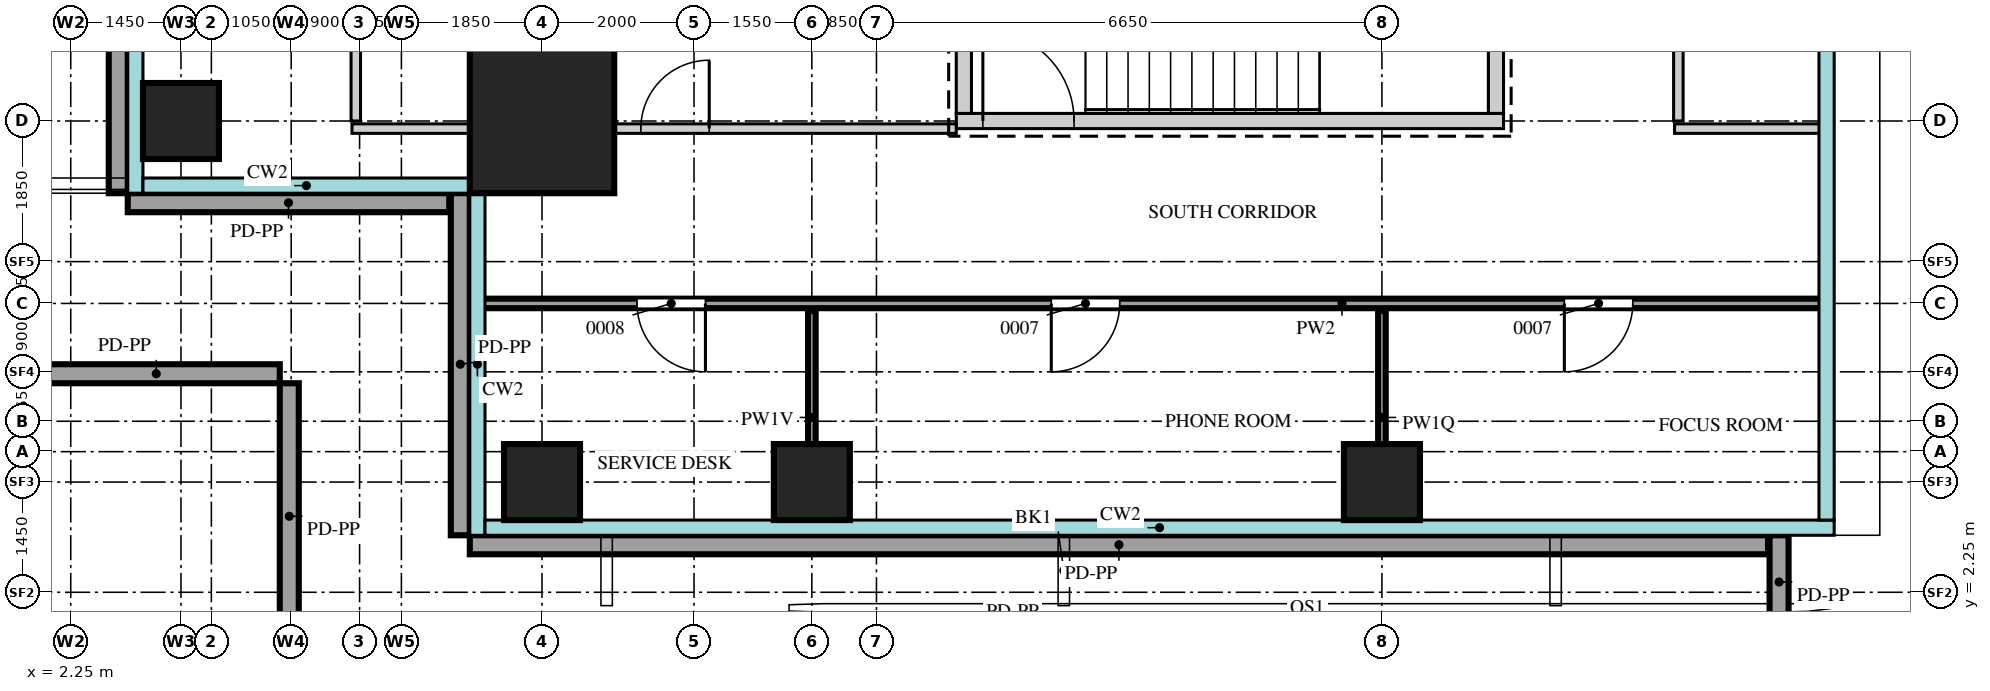
"""IFC4 building model, lengths in metres.
Left out: names, types, materials, properties, quantities, classifications, styles, units other than length and angle.
Written with IfcOpenShell. Run it as: python <this file> out.ifc"""

import sys

from ifc_helpers import new_model, si_unit, direction, frame, frame_2d, origin, origin_2d, place, context, subcontext, project, spatial, rectangle, extrude, source, transform, mapped, element, fill, save


model = new_model("IFC4")
c1 = context("Model", 3, precision=1e-05, world=origin(), true_north=direction((0.0, 1.0)))
c2 = subcontext(c1, "Body", "Model", "MODEL_VIEW")
j1 = project(units=[si_unit("LENGTHUNIT", "METRE"), si_unit("PLANEANGLEUNIT", "RADIAN")], contexts=[c1])
p1 = place(None, origin())
s1 = spatial("IfcSite", under=j1, at=p1, CompositionType="ELEMENT")
p2 = place(p1, origin())
s2 = spatial("IfcBuilding", under=s1, at=p2, CompositionType="ELEMENT")
p3 = place(p2, frame((0.0, 0.0, 164.7)))
s3 = spatial("IfcBuildingStorey", under=s2, at=p3, CompositionType="ELEMENT", Elevation=164.7)
m1 = source(origin(), c2, "Body", "SweptSolid", [
    extrude(rectangle(XDim=7.2, YDim=0.2, at=frame_2d((3.6, 0.0))), origin(), (0.0, 0.0, 1.0), 3.75),
])
p4 = place(p3, frame((13.9, 8.45, 0.0), z_axis=(0.0, 0.0, 1.0), x_axis=(1.0, 0.0, 0.0)))
e1 = element("IfcWall", 1, at=p4, inside=s3, PredefinedType="SHEAR", context=c2, shape_type="MappedRepresentation", body=[
    mapped(m1, transform((0.0, 0.0, 0.0))),
])
m2 = source(origin(), c2, "Body", "SweptSolid", [
    extrude(rectangle(XDim=1.2, YDim=2.1, at=frame_2d((0.6, 1.05))), frame((0.0, 0.11, 0.0), z_axis=(0.0, -1.0, 0.0), x_axis=(1.0, 0.0, 0.0)), (0.0, 0.0, 1.0), 0.22),
])
p5 = place(p4, frame((0.35, 0.0, 0.0)))
e2 = element("IfcOpeningElement", 2, at=p5, cuts=e1, PredefinedType="OPENING", context=c2, shape_type="MappedRepresentation", body=[
    mapped(m2, transform((0.0, 0.0, 0.0))),
])
m3 = source(origin(), c2, "Body", "SweptSolid", [
    extrude(rectangle(XDim=3.35, YDim=0.2, at=frame_2d((1.675, 0.0))), origin(), (0.0, 0.0, 1.0), 3.75),
])
for number, where, z_axis, x_axis in (
    (3, (21.0, 8.55, 0.0), (0.0, 0.0, 1.0), (0.0, 1.0, 0.0)),
    (4, (14.0, 8.55, 0.0), (0.0, 0.0, 1.0), (0.0, 1.0, 0.0)),
):
    element("IfcWall", number, at=place(p3, frame(where, z_axis=z_axis, x_axis=x_axis)), inside=s3, PredefinedType="SHEAR", context=c2, shape_type="MappedRepresentation", body=[
        mapped(m3, transform((0.0, 0.0, 0.0))),
    ])
m4 = source(origin(), c2, "Body", "SweptSolid", [
    extrude(rectangle(XDim=1.9, YDim=1.9, at=origin_2d()), origin(), (0.0, 0.0, 1.0), 4.0),
])
p6 = place(p3, frame((8.45, 8.45, 0.0), z_axis=(0.0, 0.0, 1.0), x_axis=(1.0, 0.0, 0.0)))
e5 = element("IfcColumn", 5, at=p6, inside=s3, PredefinedType="COLUMN", context=c2, shape_type="MappedRepresentation", body=[
    mapped(m4, transform((0.0, 0.0, 0.0))),
])
m5 = source(origin(), c2, "Body", "SweptSolid", [
    extrude(rectangle(XDim=1.0, YDim=1.0, at=origin_2d()), origin(), (0.0, 0.0, 1.0), 3.75),
])
for number, where, z_axis, x_axis in (
    (6, (8.45, 3.7, 0.0), (0.0, 0.0, 1.0), (1.0, 0.0, 0.0)),
    (7, (12.0, 3.7, 0.0), (0.0, 0.0, 1.0), (1.0, 0.0, 0.0)),
    (8, (19.5, 3.7, 0.0), (0.0, 0.0, 1.0), (1.0, 0.0, 0.0)),
    (9, (3.7, 8.45, 0.0), (0.0, 0.0, 1.0), (1.0, 0.0, 0.0)),
):
    element("IfcColumn", number, at=place(p3, frame(where, z_axis=z_axis, x_axis=x_axis)), inside=s3, PredefinedType="COLUMN", context=c2, shape_type="MappedRepresentation", body=[
        mapped(m5, transform((0.0, 0.0, 0.0))),
    ])
m6 = source(origin(), c2, "Body", "SweptSolid", [
    extrude(rectangle(XDim=3.25, YDim=0.25, at=frame_2d((1.625, 0.0))), origin(), (0.0, 0.0, 1.0), 1.1),
])
p7 = place(p3, frame((1.75, 5.125, 0.0), z_axis=(0.0, 0.0, 1.0), x_axis=(1.0, 0.0, 0.0)))
e10 = element("IfcWall", 10, at=p7, inside=s3, PredefinedType="SOLIDWALL", context=c2, shape_type="MappedRepresentation", body=[
    mapped(m6, transform((0.0, 0.0, 0.0))),
])
m7 = source(origin(), c2, "Body", "SweptSolid", [
    extrude(rectangle(XDim=3.5, YDim=0.25, at=frame_2d((1.75, 0.0))), origin(), (0.0, 0.0, 1.0), 1.1),
])
p8 = place(p3, frame((5.125, 5.0, 0.0), z_axis=(0.0, 0.0, 1.0), x_axis=(0.0, -1.0, 0.0)))
e11 = element("IfcWall", 11, at=p8, inside=s3, PredefinedType="SOLIDWALL", context=c2, shape_type="MappedRepresentation", body=[
    mapped(m7, transform((0.0, 0.0, 0.0))),
])
m8 = source(origin(), c2, "Body", "SweptSolid", [
    extrude(rectangle(XDim=1.23, YDim=0.25, at=frame_2d((0.615, 0.0))), origin(), (0.0, 0.0, 1.0), 1.1),
])
p9 = place(p3, frame((24.725, 1.77, 0.0), z_axis=(0.0, 0.0, 1.0), x_axis=(0.0, 1.0, 0.0)))
e12 = element("IfcWall", 12, at=p9, inside=s3, PredefinedType="SOLIDWALL", context=c2, shape_type="MappedRepresentation", body=[
    mapped(m8, transform((0.0, 0.0, 0.0))),
])
m9 = source(origin(), c2, "Body", "SweptSolid", [
    extrude(rectangle(XDim=17.08, YDim=0.25, at=frame_2d((8.54, 0.0))), origin(), (0.0, 0.0, 1.0), 1.1),
])
p10 = place(p3, frame((24.58, 2.875, 0.0), z_axis=(0.0, 0.0, 1.0), x_axis=(-1.0, 0.0, 0.0)))
e13 = element("IfcWall", 13, at=p10, inside=s3, PredefinedType="SOLIDWALL", context=c2, shape_type="MappedRepresentation", body=[
    mapped(m9, transform((0.0, 0.0, 0.0))),
])
m10 = source(origin(), c2, "Body", "SweptSolid", [
    extrude(rectangle(XDim=4.5, YDim=0.25, at=frame_2d((2.25, 0.0))), origin(), (0.0, 0.0, 1.0), 1.1),
])
p11 = place(p3, frame((7.375, 3.0, 0.0), z_axis=(0.0, 0.0, 1.0), x_axis=(0.0, 1.0, 0.0)))
e14 = element("IfcWall", 14, at=p11, inside=s3, PredefinedType="SOLIDWALL", context=c2, shape_type="MappedRepresentation", body=[
    mapped(m10, transform((0.0, 0.0, 0.0))),
])
m11 = source(origin(), c2, "Body", "SweptSolid", [
    extrude(rectangle(XDim=4.23, YDim=0.25, at=frame_2d((2.115, 0.0))), origin(), (0.0, 0.0, 1.0), 1.1),
])
p12 = place(p3, frame((7.23, 7.375, 0.0), z_axis=(0.0, 0.0, 1.0), x_axis=(-1.0, 0.0, 0.0)))
e15 = element("IfcWall", 15, at=p12, inside=s3, PredefinedType="SOLIDWALL", context=c2, shape_type="MappedRepresentation", body=[
    mapped(m11, transform((0.0, 0.0, 0.0))),
])
m12 = source(origin(), c2, "Body", "SweptSolid", [
    extrude(rectangle(XDim=39.0, YDim=0.25, at=frame_2d((19.5, 0.0))), origin(), (0.0, 0.0, 1.0), 1.1),
])
p13 = place(p3, frame((2.875, 7.5, 0.0), z_axis=(0.0, 0.0, 1.0), x_axis=(0.0, 1.0, 0.0)))
e16 = element("IfcWall", 16, at=p13, inside=s3, PredefinedType="SOLIDWALL", context=c2, shape_type="MappedRepresentation", body=[
    mapped(m12, transform((0.0, 0.0, 0.0))),
])
m13 = source(origin(), c2, "Body", "SweptSolid", [
    extrude(rectangle(XDim=2.8, YDim=0.1, at=frame_2d((1.4, 0.0))), origin(), (0.0, 0.0, 1.0), 3.25),
])
p14 = place(p3, frame((12.0, 3.15, 0.0), z_axis=(0.0, 0.0, 1.0), x_axis=(0.0, 1.0, 0.0)))
e17 = element("IfcWall", 17, at=p14, inside=s3, PredefinedType="PARTITIONING", context=c2, shape_type="MappedRepresentation", body=[
    mapped(m13, transform((0.0, 0.0, 0.0))),
])
m14 = source(origin(), c2, "Body", "SweptSolid", [
    extrude(rectangle(XDim=2.8, YDim=0.1, at=frame_2d((1.4, 0.0))), origin(), (0.0, 0.0, 1.0), 3.42),
])
p15 = place(p3, frame((19.5, 3.15, 0.0), z_axis=(0.0, 0.0, 1.0), x_axis=(0.0, 1.0, 0.0)))
e18 = element("IfcWall", 18, at=p15, inside=s3, PredefinedType="PARTITIONING", context=c2, shape_type="MappedRepresentation", body=[
    mapped(m14, transform((0.0, 0.0, 0.0))),
])
m15 = source(origin(), c2, "Body", "SweptSolid", [
    extrude(rectangle(XDim=17.65, YDim=0.125, at=frame_2d((8.825, 0.0))), origin(), (0.0, 0.0, 1.0), 3.8),
])
p16 = place(p3, frame((7.65, 6.05, 0.0), z_axis=(0.0, 0.0, 1.0), x_axis=(1.0, 0.0, 0.0)))
e19 = element("IfcWall", 19, at=p16, inside=s3, PredefinedType="PARTITIONING", context=c2, shape_type="MappedRepresentation", body=[
    mapped(m15, transform((0.0, 0.0, 0.0))),
])
m16 = source(origin(), c2, "Body", "SweptSolid", [
    extrude(rectangle(XDim=0.9, YDim=2.1, at=frame_2d((0.45, 1.05))), frame((0.0, 0.073, 0.0), z_axis=(0.0, -1.0, 0.0), x_axis=(1.0, 0.0, 0.0)), (0.0, 0.0, 1.0), 0.145),
])
p17 = place(p16, frame((2.05, 0.0, 0.0)))
e20 = element("IfcOpeningElement", 20, at=p17, cuts=e19, PredefinedType="OPENING", context=c2, shape_type="MappedRepresentation", body=[
    mapped(m16, transform((0.0, 0.0, 0.0))),
])
p18 = place(p16, frame((7.5, 0.0, 0.0)))
e21 = element("IfcOpeningElement", 21, at=p18, cuts=e19, PredefinedType="OPENING", context=c2, shape_type="MappedRepresentation", body=[
    mapped(m16, transform((0.0, 0.0, 0.0))),
])
p19 = place(p16, frame((14.25, 0.0, 0.0)))
e22 = element("IfcOpeningElement", 22, at=p19, cuts=e19, PredefinedType="OPENING", context=c2, shape_type="MappedRepresentation", body=[
    mapped(m16, transform((0.0, 0.0, 0.0))),
])
m17 = source(origin(), c2, "Body", "SweptSolid", [
    extrude(rectangle(XDim=7.95, YDim=0.125, at=frame_2d((3.975, 0.0))), origin(), (0.0, 0.0, 1.0), 3.25),
])
p20 = place(p3, frame((5.95, 8.35, 0.0), z_axis=(0.0, 0.0, 1.0), x_axis=(1.0, 0.0, 0.0)))
e23 = element("IfcWall", 23, at=p20, inside=s3, PredefinedType="PARTITIONING", context=c2, shape_type="MappedRepresentation", body=[
    mapped(m17, transform((0.0, 0.0, 0.0))),
])
p21 = place(p20, frame((3.8, 0.0, 0.0)))
e24 = element("IfcOpeningElement", 24, at=p21, cuts=e23, PredefinedType="OPENING", context=c2, shape_type="MappedRepresentation", body=[
    mapped(m16, transform((0.0, 0.0, 0.0))),
])
m18 = source(origin(), c2, "Body", "SweptSolid", [
    extrude(rectangle(XDim=1.95, YDim=0.125, at=frame_2d((0.975, 0.0))), origin(), (0.0, 0.0, 1.0), 3.8),
])
p22 = place(p3, frame((23.35, 8.35, 0.0), z_axis=(0.0, 0.0, 1.0), x_axis=(1.0, 0.0, 0.0)))
e25 = element("IfcWall", 25, at=p22, inside=s3, PredefinedType="PARTITIONING", context=c2, shape_type="MappedRepresentation", body=[
    mapped(m18, transform((0.0, 0.0, 0.0))),
])
m19 = source(origin(), c2, "Body", "SweptSolid", [
    extrude(rectangle(XDim=4.05, YDim=0.125, at=frame_2d((2.025, 0.0))), origin(), (0.0, 0.0, 1.0), 3.8),
])
p23 = place(p3, frame((6.0, 8.45, 0.0), z_axis=(0.0, 0.0, 1.0), x_axis=(0.0, 1.0, 0.0)))
e26 = element("IfcWall", 26, at=p23, inside=s3, PredefinedType="PARTITIONING", context=c2, shape_type="MappedRepresentation", body=[
    mapped(m19, transform((0.0, 0.0, 0.0))),
])
m20 = source(origin(), c2, "Body", "SweptSolid", [
    extrude(rectangle(XDim=12.45, YDim=0.125, at=frame_2d((6.225, 0.0))), origin(), (0.0, 0.0, 1.0), 3.8),
])
p24 = place(p3, frame((23.4, 8.45, 0.0), z_axis=(0.0, 0.0, 1.0), x_axis=(0.0, 1.0, 0.0)))
e27 = element("IfcWall", 27, at=p24, inside=s3, PredefinedType="PARTITIONING", context=c2, shape_type="MappedRepresentation", body=[
    mapped(m20, transform((0.0, 0.0, 0.0))),
])
p25 = place(p24, frame((5.65, 0.0, 0.0)))
e28 = element("IfcOpeningElement", 28, at=p25, cuts=e27, PredefinedType="OPENING", context=c2, shape_type="MappedRepresentation", body=[
    mapped(m16, transform((0.0, 0.0, 0.0))),
])
m21 = source(origin(), c2, "Body", "SweptSolid", [
    extrude(rectangle(XDim=0.9, YDim=2.1, at=frame_2d((0.45, 1.05))), frame((0.0, 0.025, 0.0), z_axis=(0.0, -1.0, 0.0), x_axis=(1.0, 0.0, 0.0)), (0.0, 0.0, 1.0), 0.05),
])
p26 = place(p21, origin())
e29 = element("IfcDoor", 29, at=p26, inside=s3, OperationType="SINGLE_SWING_LEFT", PredefinedType="DOOR", context=c2, shape_type="MappedRepresentation", body=[
    mapped(m21, transform((0.0, 0.0, 0.0))),
])
fill(e24, e29)
p27 = place(p17, origin())
e30 = element("IfcDoor", 30, at=p27, inside=s3, OperationType="SINGLE_SWING_RIGHT", PredefinedType="DOOR", context=c2, shape_type="MappedRepresentation", body=[
    mapped(m21, transform((0.0, 0.0, 0.0))),
])
fill(e20, e30)
p28 = place(p18, origin())
e31 = element("IfcDoor", 31, at=p28, inside=s3, OperationType="SINGLE_SWING_LEFT", PredefinedType="DOOR", context=c2, shape_type="MappedRepresentation", body=[
    mapped(m21, transform((0.0, 0.0, 0.0))),
])
fill(e21, e31)
p29 = place(p19, origin())
e32 = element("IfcDoor", 32, at=p29, inside=s3, OperationType="SINGLE_SWING_LEFT", PredefinedType="DOOR", context=c2, shape_type="MappedRepresentation", body=[
    mapped(m21, transform((0.0, 0.0, 0.0))),
])
fill(e22, e32)
m22 = source(origin(), c2, "Body", "SweptSolid", [
    extrude(rectangle(XDim=1.2, YDim=2.1, at=frame_2d((0.6, 1.05))), frame((0.0, 0.025, 0.0), z_axis=(0.0, -1.0, 0.0), x_axis=(1.0, 0.0, 0.0)), (0.0, 0.0, 1.0), 0.05),
])
p30 = place(p5, origin())
e33 = element("IfcDoor", 33, at=p30, inside=s3, OperationType="SINGLE_SWING_RIGHT", PredefinedType="DOOR", context=c2, shape_type="MappedRepresentation", body=[
    mapped(m22, transform((0.0, 0.0, 0.0))),
])
fill(e2, e33)
save(model, sys.argv[1])
